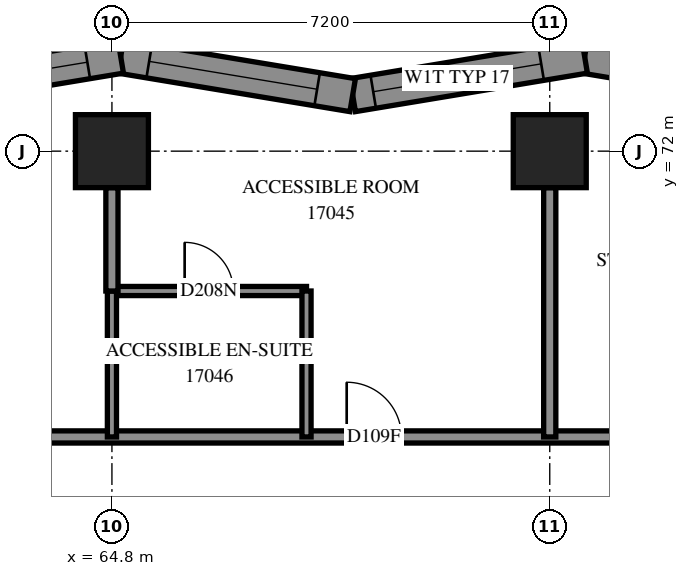
"""IFC4 building model, lengths in metres.
Left out: names, types, materials, properties, quantities, classifications, styles, units other than length and angle.
Written with IfcOpenShell. Run it as: python <this file> out.ifc"""

import sys

from ifc_helpers import new_model, si_unit, direction, frame, frame_2d, origin, origin_2d, place, context, subcontext, project, spatial, polyline, rectangle, outline, extrude, element, fill, save


model = new_model("IFC4")
c1 = context("Model", 3, precision=1e-05, world=origin(), true_north=direction((0.0, 1.0)))
c2 = subcontext(c1, "Body", "Model", "MODEL_VIEW")
j1 = project(units=[si_unit("LENGTHUNIT", "METRE"), si_unit("PLANEANGLEUNIT", "RADIAN")], contexts=[c1])
p1 = place(None, origin())
s1 = spatial("IfcSite", under=j1, at=p1, CompositionType="ELEMENT")
p2 = place(p1, origin())
s2 = spatial("IfcBuilding", under=s1, at=p2, CompositionType="ELEMENT")
p3 = place(p2, frame((0.0, 0.0, 64.4)))
s3 = spatial("IfcBuildingStorey", under=s2, at=p3, CompositionType="ELEMENT", Elevation=64.4)
for number, where, z_axis, x_axis in (
    (1, (64.8, 72.0, 0.0), (0.0, 0.0, 1.0), (1.0, 0.0, 0.0)),
    (2, (72.0, 72.0, 0.0), (0.0, 0.0, 1.0), (1.0, 0.0, 0.0)),
):
    element("IfcColumn", number, at=place(p3, frame(where, z_axis=z_axis, x_axis=x_axis)), inside=s3, PredefinedType="COLUMN", context=c2, shape_type="SweptSolid", body=[
        extrude(rectangle(XDim=1.2, YDim=1.2, at=origin_2d()), origin(), (0.0, 0.0, 1.0), 3.1),
    ])
p4 = place(p3, frame((76.41, 72.918, 0.0), z_axis=(0.0, 0.0, 1.0), x_axis=(-0.9865139149, 0.1636774136, 0.0)))
e3 = element("IfcWall", 3, at=p4, inside=s3, PredefinedType="SOLIDWALL", context=c2, shape_type="SweptSolid", body=[
    extrude(outline(polyline([(0.067, -0.275), (3.934, -0.275), (3.843, 0.275), (-0.067, 0.275), (0.067, -0.275)])), origin(), (0.0, 0.0, 1.0), 3.1),
])
p5 = place(p4, frame((1.632, 0.0, 0.5)))
e4 = element("IfcOpeningElement", 4, at=p5, cuts=e3, PredefinedType="OPENING", context=c2, shape_type="SweptSolid", body=[
    extrude(rectangle(XDim=1.2, YDim=2.45, at=frame_2d((0.6, 1.225))), frame((0.0, 0.285, 0.0), z_axis=(0.0, -1.0, 0.0), x_axis=(1.0, 0.0, 0.0)), (0.0, 0.0, 1.0), 0.57),
])
p6 = place(p3, frame((72.574, 73.554, 0.0), z_axis=(0.0, 0.0, 1.0), x_axis=(-0.9865110911, -0.1636944324, 0.0)))
e5 = element("IfcWall", 5, at=p6, inside=s3, PredefinedType="SOLIDWALL", context=c2, shape_type="SweptSolid", body=[
    extrude(outline(polyline([(-0.046, -0.275), (3.821, -0.275), (3.913, 0.275), (0.046, 0.275), (-0.046, -0.275)])), origin(), (0.0, 0.0, 1.0), 3.1),
])
p7 = place(p6, frame((0.724, 0.0, 0.5)))
e6 = element("IfcOpeningElement", 6, at=p7, cuts=e5, PredefinedType="OPENING", context=c2, shape_type="SweptSolid", body=[
    extrude(rectangle(XDim=2.8, YDim=2.45, at=frame_2d((1.4, 1.225))), frame((0.0, 0.285, 0.0), z_axis=(0.0, -1.0, 0.0), x_axis=(1.0, 0.0, 0.0)), (0.0, 0.0, 1.0), 0.57),
])
p8 = place(p3, frame((68.759, 72.921, 0.0), z_axis=(0.0, 0.0, 1.0), x_axis=(-0.9865110911, 0.1636944324, 0.0)))
e7 = element("IfcWall", 7, at=p8, inside=s3, PredefinedType="SOLIDWALL", context=c2, shape_type="SweptSolid", body=[
    extrude(outline(polyline([(0.046, -0.275), (3.913, -0.275), (3.821, 0.275), (-0.046, 0.275), (0.046, -0.275)])), origin(), (0.0, 0.0, 1.0), 3.1),
])
p9 = place(p8, frame((0.593, 0.0, 0.5)))
e8 = element("IfcOpeningElement", 8, at=p9, cuts=e7, PredefinedType="OPENING", context=c2, shape_type="SweptSolid", body=[
    extrude(rectangle(XDim=2.8, YDim=2.45, at=frame_2d((1.4, 1.225))), frame((0.0, 0.285, 0.0), z_axis=(0.0, -1.0, 0.0), x_axis=(1.0, 0.0, 0.0)), (0.0, 0.0, 1.0), 0.57),
])
p10 = place(p3, frame((64.944, 73.554, 0.0), z_axis=(0.0, 0.0, 1.0), x_axis=(-0.9865103981, -0.1636986085, 0.0)))
e9 = element("IfcWall", 9, at=p10, inside=s3, PredefinedType="SOLIDWALL", context=c2, shape_type="SweptSolid", body=[
    extrude(outline(polyline([(-0.046, -0.275), (3.821, -0.275), (3.913, 0.275), (0.046, 0.275), (-0.046, -0.275)])), origin(), (0.0, 0.0, 1.0), 3.1),
])
p11 = place(p10, frame((0.556, 0.0, 0.5)))
e10 = element("IfcOpeningElement", 10, at=p11, cuts=e9, PredefinedType="OPENING", context=c2, shape_type="SweptSolid", body=[
    extrude(rectangle(XDim=2.8, YDim=2.45, at=frame_2d((1.4, 1.225))), frame((0.0, 0.285, 0.0), z_axis=(0.0, -1.0, 0.0), x_axis=(1.0, 0.0, 0.0)), (0.0, 0.0, 1.0), 0.57),
])
p12 = place(p3, frame((55.1, 67.3, 0.0), z_axis=(0.0, 0.0, 1.0), x_axis=(1.0, 0.0, 0.0)))
e11 = element("IfcWall", 11, at=p12, inside=s3, PredefinedType="PARTITIONING", context=c2, shape_type="SweptSolid", body=[
    extrude(rectangle(XDim=19.4, YDim=0.2, at=frame_2d((9.7, 0.0))), origin(), (0.0, 0.0, 1.0), 3.1),
])
p13 = place(p12, frame((6.361, 0.0, 0.0)))
e12 = element("IfcOpeningElement", 12, at=p13, cuts=e11, PredefinedType="OPENING", context=c2, shape_type="SweptSolid", body=[
    extrude(rectangle(XDim=0.9, YDim=2.1, at=frame_2d((0.45, 1.05))), frame((0.0, 0.11, 0.0), z_axis=(0.0, -1.0, 0.0), x_axis=(1.0, 0.0, 0.0)), (0.0, 0.0, 1.0), 0.22),
])
p14 = place(p12, frame((13.561, 0.0, 0.0)))
e13 = element("IfcOpeningElement", 13, at=p14, cuts=e11, PredefinedType="OPENING", context=c2, shape_type="SweptSolid", body=[
    extrude(rectangle(XDim=0.9, YDim=2.1, at=frame_2d((0.45, 1.05))), frame((0.0, 0.11, 0.0), z_axis=(0.0, -1.0, 0.0), x_axis=(1.0, 0.0, 0.0)), (0.0, 0.0, 1.0), 0.22),
])
p15 = place(p3, frame((72.0, 67.3, 0.0), z_axis=(0.0, 0.0, 1.0), x_axis=(0.0, 1.0, 0.0)))
e14 = element("IfcWall", 14, at=p15, inside=s3, PredefinedType="PARTITIONING", context=c2, shape_type="SweptSolid", body=[
    extrude(rectangle(XDim=4.1, YDim=0.2, at=frame_2d((2.05, 0.0))), origin(), (0.0, 0.0, 1.0), 3.1),
])
p16 = place(p3, frame((64.8, 69.7, 0.0), z_axis=(0.0, 0.0, 1.0), x_axis=(1.0, 0.0, 0.0)))
e15 = element("IfcWall", 15, at=p16, inside=s3, PredefinedType="PARTITIONING", context=c2, shape_type="SweptSolid", body=[
    extrude(rectangle(XDim=3.2, YDim=0.15, at=frame_2d((1.6, 0.0))), origin(), (0.0, 0.0, 1.0), 3.1),
])
p17 = place(p16, frame((1.196, 0.0, 0.0)))
e16 = element("IfcOpeningElement", 16, at=p17, cuts=e15, PredefinedType="OPENING", context=c2, shape_type="SweptSolid", body=[
    extrude(rectangle(XDim=0.8, YDim=2.1, at=frame_2d((0.4, 1.05))), frame((0.0, 0.085, 0.0), z_axis=(0.0, -1.0, 0.0), x_axis=(1.0, 0.0, 0.0)), (0.0, 0.0, 1.0), 0.17),
])
for number, where, z_axis, x_axis in (
    (17, (68.0, 67.3, 0.0), (0.0, 0.0, 1.0), (0.0, 1.0, 0.0)),
    (18, (64.8, 67.3, 0.0), (0.0, 0.0, 1.0), (0.0, 1.0, 0.0)),
):
    element("IfcWall", number, at=place(p3, frame(where, z_axis=z_axis, x_axis=x_axis)), inside=s3, PredefinedType="PARTITIONING", context=c2, shape_type="SweptSolid", body=[
        extrude(rectangle(XDim=2.4, YDim=0.15, at=frame_2d((1.2, 0.0))), origin(), (0.0, 0.0, 1.0), 3.1),
    ])
p18 = place(p3, frame((64.8, 69.7, 0.0), z_axis=(0.0, 0.0, 1.0), x_axis=(0.0, 1.0, 0.0)))
e19 = element("IfcWall", 19, at=p18, inside=s3, PredefinedType="PARTITIONING", context=c2, shape_type="SweptSolid", body=[
    extrude(rectangle(XDim=1.7, YDim=0.2, at=frame_2d((0.85, 0.0))), origin(), (0.0, 0.0, 1.0), 3.1),
])
p19 = place(p7, origin())
e20 = element("IfcWindow", 20, at=p19, inside=s3, PartitioningType="SINGLE_PANEL", PredefinedType="WINDOW", context=c2, shape_type="SweptSolid", body=[
    extrude(rectangle(XDim=2.8, YDim=2.45, at=frame_2d((1.4, 1.225))), frame((0.0, 0.155, 0.0), z_axis=(0.0, -1.0, 0.0), x_axis=(1.0, 0.0, 0.0)), (0.0, 0.0, 1.0), 0.06),
])
fill(e6, e20)
p20 = place(p9, origin())
e21 = element("IfcWindow", 21, at=p20, inside=s3, PartitioningType="SINGLE_PANEL", PredefinedType="WINDOW", context=c2, shape_type="SweptSolid", body=[
    extrude(rectangle(XDim=2.8, YDim=2.45, at=frame_2d((1.4, 1.225))), frame((0.0, 0.155, 0.0), z_axis=(0.0, -1.0, 0.0), x_axis=(1.0, 0.0, 0.0)), (0.0, 0.0, 1.0), 0.06),
])
fill(e8, e21)
p21 = place(p11, origin())
e22 = element("IfcWindow", 22, at=p21, inside=s3, PartitioningType="SINGLE_PANEL", PredefinedType="WINDOW", context=c2, shape_type="SweptSolid", body=[
    extrude(rectangle(XDim=2.8, YDim=2.45, at=frame_2d((1.4, 1.225))), frame((0.0, 0.155, 0.0), z_axis=(0.0, -1.0, 0.0), x_axis=(1.0, 0.0, 0.0)), (0.0, 0.0, 1.0), 0.06),
])
fill(e10, e22)
p22 = place(p14, origin())
e23 = element("IfcDoor", 23, at=p22, inside=s3, OperationType="SINGLE_SWING_RIGHT", PredefinedType="DOOR", context=c2, shape_type="SweptSolid", body=[
    extrude(rectangle(XDim=0.9, YDim=2.1, at=frame_2d((0.45, 1.05))), frame((0.0, 0.025, 0.0), z_axis=(0.0, -1.0, 0.0), x_axis=(1.0, 0.0, 0.0)), (0.0, 0.0, 1.0), 0.05),
])
fill(e13, e23)
p23 = place(p17, origin())
e24 = element("IfcDoor", 24, at=p23, inside=s3, OperationType="SINGLE_SWING_RIGHT", PredefinedType="DOOR", context=c2, shape_type="SweptSolid", body=[
    extrude(rectangle(XDim=0.8, YDim=2.1, at=frame_2d((0.4, 1.05))), frame((0.0, 0.025, 0.0), z_axis=(0.0, -1.0, 0.0), x_axis=(1.0, 0.0, 0.0)), (0.0, 0.0, 1.0), 0.05),
])
fill(e16, e24)
save(model, sys.argv[1])
